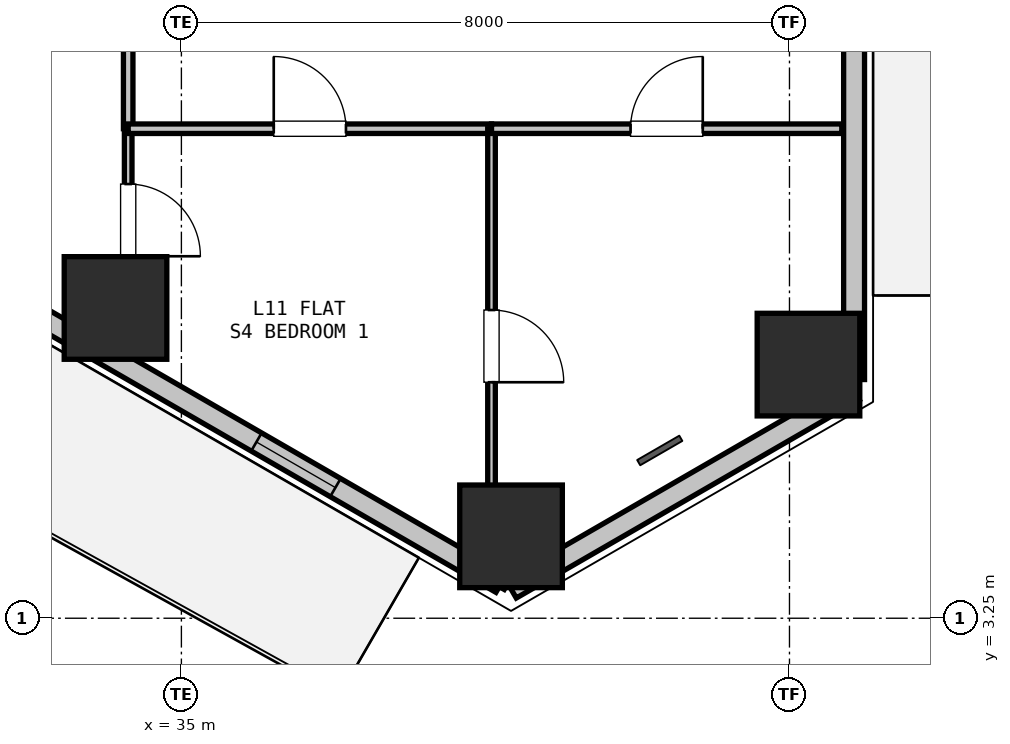
"""IFC4 building model, lengths in metres.
Left out: names, types, materials, properties, quantities, classifications, styles, units other than length and angle.
Written with IfcOpenShell. Run it as: python <this file> out.ifc"""

import sys

from ifc_helpers import new_model, si_unit, direction, frame, frame_2d, origin, origin_2d, place, context, subcontext, project, spatial, rectangle, hollow_rectangle, extrude, element, fill, save


model = new_model("IFC4")
c1 = context("Model", 3, precision=1e-05, world=origin(), true_north=direction((0.0, 1.0)))
c2 = subcontext(c1, "Body", "Model", "MODEL_VIEW")
j1 = project(units=[si_unit("LENGTHUNIT", "METRE"), si_unit("PLANEANGLEUNIT", "RADIAN")], contexts=[c1])
p1 = place(None, origin())
s1 = spatial("IfcSite", under=j1, at=p1, CompositionType="ELEMENT")
p2 = place(p1, origin())
s2 = spatial("IfcBuilding", under=s1, at=p2, CompositionType="ELEMENT")
p3 = place(p2, frame((0.0, 0.0, 42.3)))
s3 = spatial("IfcBuildingStorey", under=s2, at=p3, CompositionType="ELEMENT", Elevation=42.3)
for number, where, z_axis, x_axis in (
    (1, (43.25, 6.587, 0.0), (0.0, 0.0, 1.0), (1.0, 0.0, 0.0)),
    (2, (39.337, 4.327, 0.0), (0.0, 0.0, 1.0), (1.0, 0.0, 0.0)),
    (3, (34.133, 7.332, 0.0), (0.0, 0.0, 1.0), (1.0, 0.0, 0.0)),
):
    element("IfcColumn", number, at=place(p3, frame(where, z_axis=z_axis, x_axis=x_axis)), inside=s3, PredefinedType="COLUMN", context=c2, shape_type="SweptSolid", body=[
        extrude(hollow_rectangle(XDim=1.35, YDim=1.35, WallThickness=0.036, at=origin_2d()), origin(), (0.0, 0.0, 1.0), 3.3),
    ])
p4 = place(p3, frame((43.85, 6.24, 0.0), z_axis=(0.0, 0.0, 1.0), x_axis=(-0.866043601342, -0.499968479581, 0.0)))
e4 = element("IfcWall", 4, at=p4, inside=s3, PredefinedType="SOLIDWALL", context=c2, shape_type="SweptSolid", body=[
    extrude(rectangle(XDim=5.211, YDim=0.275, at=frame_2d((2.605, 0.0))), origin(), (0.0, 0.0, 1.0), 2.66),
])
p5 = place(p3, frame((43.85, 19.063, 0.0), z_axis=(0.0, 0.0, 1.0), x_axis=(0.0, -1.0, 0.0)))
e5 = element("IfcWall", 5, at=p5, inside=s3, PredefinedType="SOLIDWALL", context=c2, shape_type="SweptSolid", body=[
    extrude(rectangle(XDim=12.673, YDim=0.275, at=frame_2d((6.336, 0.0))), origin(), (0.0, 0.0, 1.0), 2.66),
])
p6 = place(p3, frame((39.207, 3.71, 0.0), z_axis=(0.0, 0.0, 1.0), x_axis=(-0.86603192154, 0.499988710747, 0.0)))
e6 = element("IfcWall", 6, at=p6, inside=s3, PredefinedType="SOLIDWALL", context=c2, shape_type="SweptSolid", body=[
    extrude(rectangle(XDim=12.673, YDim=0.275, at=frame_2d((6.336, 0.0))), origin(), (0.0, 0.0, 1.0), 2.66),
])
p7 = place(p6, frame((8.136, 0.0, 0.0)))
e7 = element("IfcOpeningElement", 7, at=p7, cuts=e6, PredefinedType="OPENING", context=c2, shape_type="SweptSolid", body=[
    extrude(rectangle(XDim=1.0, YDim=2.1, at=frame_2d((0.5, 1.05))), frame((0.0, 0.147, 0.0), z_axis=(0.0, -1.0, 0.0), x_axis=(1.0, 0.0, 0.0)), (0.0, 0.0, 1.0), 0.295),
])
p8 = place(p6, frame((2.518, 0.0, 0.9)))
e8 = element("IfcOpeningElement", 8, at=p8, cuts=e6, PredefinedType="OPENING", context=c2, shape_type="SweptSolid", body=[
    extrude(rectangle(XDim=1.2, YDim=1.4, at=frame_2d((0.6, 0.7))), frame((0.0, 0.147, 0.0), z_axis=(0.0, -1.0, 0.0), x_axis=(1.0, 0.0, 0.0)), (0.0, 0.0, 1.0), 0.295),
])
p9 = place(p3, frame((34.3, 15.75, 0.0), z_axis=(0.0, 0.0, 1.0), x_axis=(0.0, -1.0, 0.0)))
e9 = element("IfcWall", 9, at=p9, inside=s3, PredefinedType="PARTITIONING", context=c2, shape_type="SweptSolid", body=[
    extrude(rectangle(XDim=6.06, YDim=0.125, at=frame_2d((3.03, 0.0))), origin(), (0.0, 0.0, 1.0), 3.04),
])
p10 = place(p9, frame((2.555, 0.0, 0.0)))
e10 = element("IfcOpeningElement", 10, at=p10, cuts=e9, PredefinedType="OPENING", context=c2, shape_type="SweptSolid", body=[
    extrude(rectangle(XDim=0.95, YDim=2.1, at=frame_2d((0.475, 1.05))), frame((0.0, 0.073, 0.0), z_axis=(0.0, -1.0, 0.0), x_axis=(1.0, 0.0, 0.0)), (0.0, 0.0, 1.0), 0.145),
])
p11 = place(p3, frame((34.3, 9.69, 0.0), z_axis=(0.0, 0.0, 1.0), x_axis=(0.0, -1.0, 0.0)))
e11 = element("IfcWall", 11, at=p11, inside=s3, PredefinedType="PARTITIONING", context=c2, shape_type="SweptSolid", body=[
    extrude(rectangle(XDim=2.961, YDim=0.1, at=frame_2d((1.48, 0.0))), origin(), (0.0, 0.0, 1.0), 3.04),
])
p12 = place(p11, frame((0.728, 0.0, 0.0)))
e12 = element("IfcOpeningElement", 12, at=p12, cuts=e11, PredefinedType="OPENING", context=c2, shape_type="SweptSolid", body=[
    extrude(rectangle(XDim=0.95, YDim=2.1, at=frame_2d((0.475, 1.05))), frame((0.0, 0.06, 0.0), z_axis=(0.0, -1.0, 0.0), x_axis=(1.0, 0.0, 0.0)), (0.0, 0.0, 1.0), 0.12),
])
p13 = place(p3, frame((34.3, 9.69, 0.0), z_axis=(0.0, 0.0, 1.0), x_axis=(1.0, 0.0, 0.0)))
e13 = element("IfcWall", 13, at=p13, inside=s3, PredefinedType="PARTITIONING", context=c2, shape_type="SweptSolid", body=[
    extrude(rectangle(XDim=4.78, YDim=0.125, at=frame_2d((2.39, 0.0))), origin(), (0.0, 0.0, 1.0), 3.04),
])
p14 = place(p13, frame((1.915, 0.0, 0.0)))
e14 = element("IfcOpeningElement", 14, at=p14, cuts=e13, PredefinedType="OPENING", context=c2, shape_type="SweptSolid", body=[
    extrude(rectangle(XDim=0.95, YDim=2.1, at=frame_2d((0.475, 1.05))), frame((0.0, 0.073, 0.0), z_axis=(0.0, -1.0, 0.0), x_axis=(1.0, 0.0, 0.0)), (0.0, 0.0, 1.0), 0.145),
])
p15 = place(p3, frame((39.08, 9.69, 0.0), z_axis=(0.0, 0.0, 1.0), x_axis=(0.0, -1.0, 0.0)))
e15 = element("IfcWall", 15, at=p15, inside=s3, PredefinedType="PARTITIONING", context=c2, shape_type="SweptSolid", body=[
    extrude(rectangle(XDim=5.72, YDim=0.1, at=frame_2d((2.86, 0.0))), origin(), (0.0, 0.0, 1.0), 3.04),
])
p16 = place(p15, frame((2.385, 0.0, 0.0)))
e16 = element("IfcOpeningElement", 16, at=p16, cuts=e15, PredefinedType="OPENING", context=c2, shape_type="SweptSolid", body=[
    extrude(rectangle(XDim=0.95, YDim=2.1, at=frame_2d((0.475, 1.05))), frame((0.0, 0.06, 0.0), z_axis=(0.0, -1.0, 0.0), x_axis=(1.0, 0.0, 0.0)), (0.0, 0.0, 1.0), 0.12),
])
p17 = place(p3, frame((39.08, 9.69, 0.0), z_axis=(0.0, 0.0, 1.0), x_axis=(1.0, 0.0, 0.0)))
e17 = element("IfcWall", 17, at=p17, inside=s3, PredefinedType="PARTITIONING", context=c2, shape_type="SweptSolid", body=[
    extrude(rectangle(XDim=4.608, YDim=0.125, at=frame_2d((2.304, 0.0))), origin(), (0.0, 0.0, 1.0), 2.337),
])
p18 = place(p17, frame((1.829, 0.0, 0.0)))
e18 = element("IfcOpeningElement", 18, at=p18, cuts=e17, PredefinedType="OPENING", context=c2, shape_type="SweptSolid", body=[
    extrude(rectangle(XDim=0.95, YDim=2.1, at=frame_2d((0.475, 1.05))), frame((0.0, 0.073, 0.0), z_axis=(0.0, -1.0, 0.0), x_axis=(1.0, 0.0, 0.0)), (0.0, 0.0, 1.0), 0.145),
])
p19 = place(p3, frame((39.272, 3.672, 0.0), z_axis=(0.0, 0.0, 1.0), x_axis=(-0.866442544969, 0.49927679324, 0.0)))
e19 = element("IfcWall", 19, at=p19, inside=s3, PredefinedType="PARTITIONING", context=c2, shape_type="SweptSolid", body=[
    extrude(rectangle(XDim=0.142, YDim=0.1, at=frame_2d((0.071, 0.0))), origin(), (0.0, 0.0, 1.0), 3.04),
])
p20 = place(p8, origin())
e20 = element("IfcWindow", 20, at=p20, inside=s3, PartitioningType="SINGLE_PANEL", PredefinedType="WINDOW", context=c2, shape_type="SweptSolid", body=[
    extrude(rectangle(XDim=1.2, YDim=1.4, at=frame_2d((0.6, 0.7))), frame((0.0, 0.03, 0.0), z_axis=(0.0, -1.0, 0.0), x_axis=(1.0, 0.0, 0.0)), (0.0, 0.0, 1.0), 0.06),
])
fill(e8, e20)
p21 = place(p12, origin())
e21 = element("IfcDoor", 21, at=p21, inside=s3, OperationType="SINGLE_SWING_RIGHT", PredefinedType="DOOR", context=c2, shape_type="SweptSolid", body=[
    extrude(rectangle(XDim=0.95, YDim=2.1, at=frame_2d((0.475, 1.05))), frame((0.0, 0.025, 0.0), z_axis=(0.0, -1.0, 0.0), x_axis=(1.0, 0.0, 0.0)), (0.0, 0.0, 1.0), 0.05),
])
fill(e12, e21)
p22 = place(p16, origin())
e22 = element("IfcDoor", 22, at=p22, inside=s3, OperationType="SINGLE_SWING_RIGHT", PredefinedType="DOOR", context=c2, shape_type="SweptSolid", body=[
    extrude(rectangle(XDim=0.95, YDim=2.1, at=frame_2d((0.475, 1.05))), frame((0.0, 0.025, 0.0), z_axis=(0.0, -1.0, 0.0), x_axis=(1.0, 0.0, 0.0)), (0.0, 0.0, 1.0), 0.05),
])
fill(e16, e22)
p23 = place(p14, origin())
e23 = element("IfcDoor", 23, at=p23, inside=s3, OperationType="SINGLE_SWING_LEFT", PredefinedType="DOOR", context=c2, shape_type="SweptSolid", body=[
    extrude(rectangle(XDim=0.95, YDim=2.1, at=frame_2d((0.475, 1.05))), frame((0.0, 0.025, 0.0), z_axis=(0.0, -1.0, 0.0), x_axis=(1.0, 0.0, 0.0)), (0.0, 0.0, 1.0), 0.05),
])
fill(e14, e23)
p24 = place(p18, origin())
e24 = element("IfcDoor", 24, at=p24, inside=s3, OperationType="SINGLE_SWING_RIGHT", PredefinedType="DOOR", context=c2, shape_type="SweptSolid", body=[
    extrude(rectangle(XDim=0.95, YDim=2.1, at=frame_2d((0.475, 1.05))), frame((0.0, 0.025, 0.0), z_axis=(0.0, -1.0, 0.0), x_axis=(1.0, 0.0, 0.0)), (0.0, 0.0, 1.0), 0.05),
])
fill(e18, e24)
save(model, sys.argv[1])
